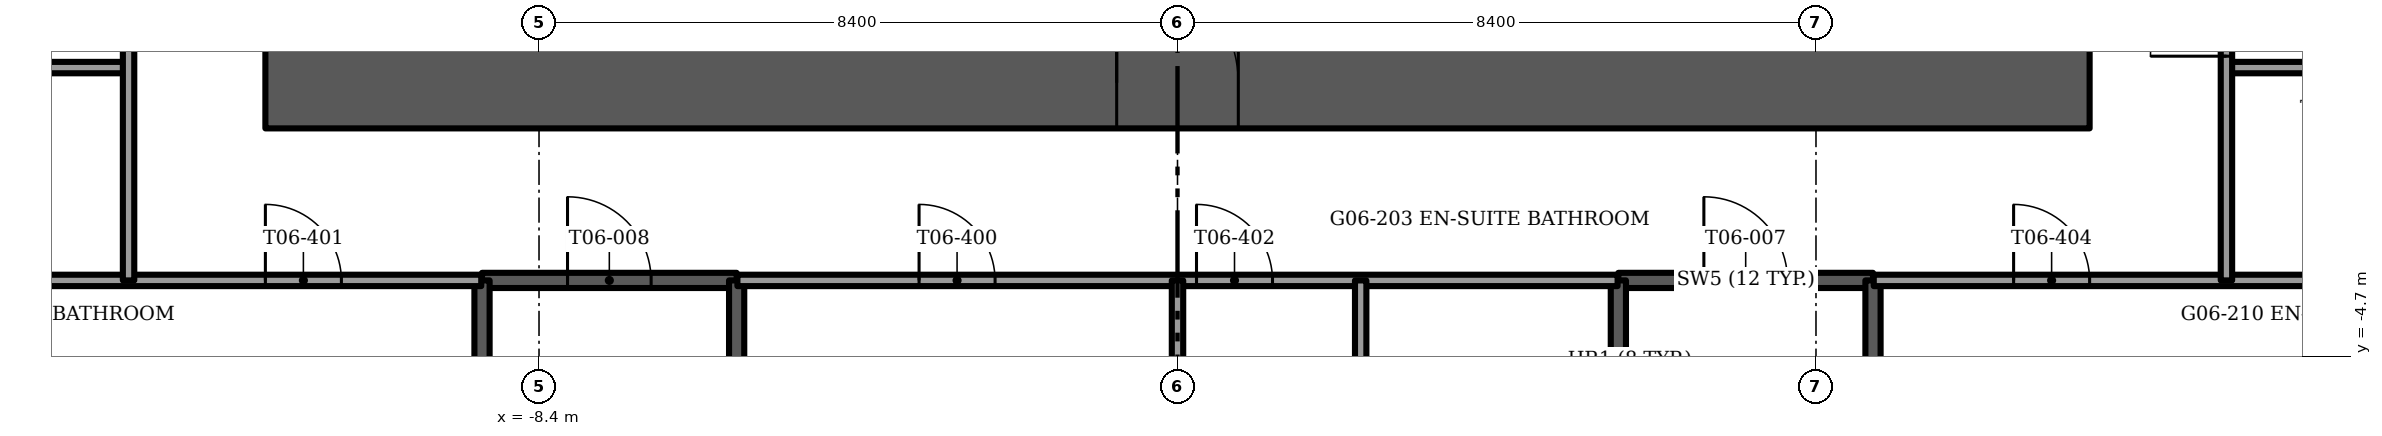
"""IFC4 building model, lengths in metres.
Left out: names, types, materials, properties, quantities, classifications, styles, units other than length and angle.
Written with IfcOpenShell. Run it as: python <this file> out.ifc"""

import sys

from ifc_helpers import new_model, si_unit, direction, frame, frame_2d, origin, place, context, subcontext, project, spatial, rectangle, extrude, element, fill, save


model = new_model("IFC4")
c1 = context("Model", 3, precision=1e-05, world=origin(), true_north=direction((0.0, 1.0)))
c2 = subcontext(c1, "Body", "Model", "MODEL_VIEW")
j1 = project(units=[si_unit("LENGTHUNIT", "METRE"), si_unit("PLANEANGLEUNIT", "RADIAN")], contexts=[c1])
p1 = place(None, origin())
s1 = spatial("IfcSite", under=j1, at=p1, CompositionType="ELEMENT")
p2 = place(p1, origin())
s2 = spatial("IfcBuilding", under=s1, at=p2, CompositionType="ELEMENT")
p3 = place(p2, frame((0.0, 0.0, 28.0)))
s3 = spatial("IfcBuildingStorey", under=s2, at=p3, CompositionType="ELEMENT", Elevation=28.0)
p4 = place(p3, frame((-12.0, -1.1, -0.3), z_axis=(0.0, 0.0, 1.0), x_axis=(1.0, 0.0, 0.0)))
e1 = element("IfcWall", 1, at=p4, inside=s3, PredefinedType="SHEAR", context=c2, shape_type="SweptSolid", body=[
    extrude(rectangle(XDim=24.0, YDim=1.2, at=frame_2d((12.0, 0.0))), origin(), (0.0, 0.0, 1.0), 3.75),
])
p5 = place(p4, frame((11.2, 0.0, 0.0)))
e2 = element("IfcOpeningElement", 2, at=p5, cuts=e1, PredefinedType="OPENING", context=c2, shape_type="SweptSolid", body=[
    extrude(rectangle(XDim=1.6, YDim=2.1, at=frame_2d((0.8, 1.05))), frame((0.0, 0.6, 0.0), z_axis=(0.0, -1.0, 0.0), x_axis=(1.0, 0.0, 0.0)), (0.0, 0.0, 1.0), 1.2),
])
p6 = place(p3, frame((-20.968, -0.532, 0.0), z_axis=(0.0, 0.0, 1.0), x_axis=(0.500003237297, -0.866023534722, 0.0)))
e3 = element("IfcWall", 3, at=p6, inside=s3, PredefinedType="SOLIDWALL", context=c2, shape_type="SweptSolid", body=[
    extrude(rectangle(XDim=20.046, YDim=0.15, at=frame_2d((10.023, 0.0))), origin(), (0.0, 0.0, 1.0), 3.45),
])
p7 = place(p6, frame((1.923, 0.0, 0.15)))
e4 = element("IfcOpeningElement", 4, at=p7, cuts=e3, PredefinedType="OPENING", context=c2, shape_type="SweptSolid", body=[
    extrude(rectangle(XDim=0.9, YDim=2.85, at=frame_2d((0.45, 1.425))), frame((0.0, 0.075, 0.0), z_axis=(0.0, -1.0, 0.0), x_axis=(1.0, 0.0, 0.0)), (0.0, 0.0, 1.0), 0.15),
])
p8 = place(p6, frame((6.123, 0.0, 0.15)))
e5 = element("IfcOpeningElement", 5, at=p8, cuts=e3, PredefinedType="OPENING", context=c2, shape_type="SweptSolid", body=[
    extrude(rectangle(XDim=1.8, YDim=2.85, at=frame_2d((0.9, 1.425))), frame((0.0, 0.075, 0.0), z_axis=(0.0, -1.0, 0.0), x_axis=(1.0, 0.0, 0.0)), (0.0, 0.0, 1.0), 0.15),
])
p9 = place(p6, frame((8.223, 0.0, 0.0)))
e6 = element("IfcOpeningElement", 6, at=p9, cuts=e3, PredefinedType="OPENING", context=c2, shape_type="SweptSolid", body=[
    extrude(rectangle(XDim=1.5, YDim=2.4, at=frame_2d((0.75, 1.2))), frame((0.0, 0.075, 0.0), z_axis=(0.0, -1.0, 0.0), x_axis=(1.0, 0.0, 0.0)), (0.0, 0.0, 1.0), 0.15),
])
p10 = place(p6, frame((10.323, 0.0, 0.15)))
e7 = element("IfcOpeningElement", 7, at=p10, cuts=e3, PredefinedType="OPENING", context=c2, shape_type="SweptSolid", body=[
    extrude(rectangle(XDim=1.8, YDim=2.85, at=frame_2d((0.9, 1.425))), frame((0.0, 0.075, 0.0), z_axis=(0.0, -1.0, 0.0), x_axis=(1.0, 0.0, 0.0)), (0.0, 0.0, 1.0), 0.15),
])
p11 = place(p6, frame((12.423, 0.0, 0.0)))
e8 = element("IfcOpeningElement", 8, at=p11, cuts=e3, PredefinedType="OPENING", context=c2, shape_type="SweptSolid", body=[
    extrude(rectangle(XDim=1.5, YDim=2.4, at=frame_2d((0.75, 1.2))), frame((0.0, 0.075, 0.0), z_axis=(0.0, -1.0, 0.0), x_axis=(1.0, 0.0, 0.0)), (0.0, 0.0, 1.0), 0.15),
])
p12 = place(p6, frame((14.523, 0.0, 0.15)))
e9 = element("IfcOpeningElement", 9, at=p12, cuts=e3, PredefinedType="OPENING", context=c2, shape_type="SweptSolid", body=[
    extrude(rectangle(XDim=1.8, YDim=2.85, at=frame_2d((0.9, 1.425))), frame((0.0, 0.075, 0.0), z_axis=(0.0, -1.0, 0.0), x_axis=(1.0, 0.0, 0.0)), (0.0, 0.0, 1.0), 0.15),
])
p13 = place(p6, frame((16.623, 0.0, 0.0)))
e10 = element("IfcOpeningElement", 10, at=p13, cuts=e3, PredefinedType="OPENING", context=c2, shape_type="SweptSolid", body=[
    extrude(rectangle(XDim=1.5, YDim=2.4, at=frame_2d((0.75, 1.2))), frame((0.0, 0.075, 0.0), z_axis=(0.0, -1.0, 0.0), x_axis=(1.0, 0.0, 0.0)), (0.0, 0.0, 1.0), 0.15),
])
p14 = place(p6, frame((0.311, 0.0, 0.15)))
e11 = element("IfcOpeningElement", 11, at=p14, cuts=e3, PredefinedType="OPENING", context=c2, shape_type="SweptSolid", body=[
    extrude(rectangle(XDim=0.9, YDim=2.73, at=frame_2d((0.45, 1.365))), frame((0.0, 0.075, 0.0), z_axis=(0.0, -1.0, 0.0), x_axis=(1.0, 0.0, 0.0)), (0.0, 0.0, 1.0), 0.15),
])
p15 = place(p6, frame((18.834, 0.0, 0.15)))
e12 = element("IfcOpeningElement", 12, at=p15, cuts=e3, PredefinedType="OPENING", context=c2, shape_type="SweptSolid", body=[
    extrude(rectangle(XDim=0.9, YDim=2.73, at=frame_2d((0.45, 1.365))), frame((0.0, 0.075, 0.0), z_axis=(0.0, -1.0, 0.0), x_axis=(1.0, 0.0, 0.0)), (0.0, 0.0, 1.0), 0.15),
])
p16 = place(p3, frame((10.945, -17.893, 0.0), z_axis=(0.0, 0.0, 1.0), x_axis=(0.500003237297, 0.866023534722, 0.0)))
e13 = element("IfcWall", 13, at=p16, inside=s3, PredefinedType="SOLIDWALL", context=c2, shape_type="SweptSolid", body=[
    extrude(rectangle(XDim=20.046, YDim=0.15, at=frame_2d((10.023, 0.0))), origin(), (0.0, 0.0, 1.0), 3.45),
])
p17 = place(p16, frame((1.923, 0.0, 0.15)))
e14 = element("IfcOpeningElement", 14, at=p17, cuts=e13, PredefinedType="OPENING", context=c2, shape_type="SweptSolid", body=[
    extrude(rectangle(XDim=1.8, YDim=2.85, at=frame_2d((0.9, 1.425))), frame((0.0, 0.075, 0.0), z_axis=(0.0, -1.0, 0.0), x_axis=(1.0, 0.0, 0.0)), (0.0, 0.0, 1.0), 0.15),
])
p18 = place(p16, frame((4.023, 0.0, 0.0)))
e15 = element("IfcOpeningElement", 15, at=p18, cuts=e13, PredefinedType="OPENING", context=c2, shape_type="SweptSolid", body=[
    extrude(rectangle(XDim=1.5, YDim=2.4, at=frame_2d((0.75, 1.2))), frame((0.0, 0.075, 0.0), z_axis=(0.0, -1.0, 0.0), x_axis=(1.0, 0.0, 0.0)), (0.0, 0.0, 1.0), 0.15),
])
p19 = place(p16, frame((6.123, 0.0, 0.15)))
e16 = element("IfcOpeningElement", 16, at=p19, cuts=e13, PredefinedType="OPENING", context=c2, shape_type="SweptSolid", body=[
    extrude(rectangle(XDim=1.8, YDim=2.85, at=frame_2d((0.9, 1.425))), frame((0.0, 0.075, 0.0), z_axis=(0.0, -1.0, 0.0), x_axis=(1.0, 0.0, 0.0)), (0.0, 0.0, 1.0), 0.15),
])
p20 = place(p16, frame((8.223, 0.0, 0.0)))
e17 = element("IfcOpeningElement", 17, at=p20, cuts=e13, PredefinedType="OPENING", context=c2, shape_type="SweptSolid", body=[
    extrude(rectangle(XDim=1.5, YDim=2.4, at=frame_2d((0.75, 1.2))), frame((0.0, 0.075, 0.0), z_axis=(0.0, -1.0, 0.0), x_axis=(1.0, 0.0, 0.0)), (0.0, 0.0, 1.0), 0.15),
])
p21 = place(p16, frame((10.323, 0.0, 0.15)))
e18 = element("IfcOpeningElement", 18, at=p21, cuts=e13, PredefinedType="OPENING", context=c2, shape_type="SweptSolid", body=[
    extrude(rectangle(XDim=1.8, YDim=2.85, at=frame_2d((0.9, 1.425))), frame((0.0, 0.075, 0.0), z_axis=(0.0, -1.0, 0.0), x_axis=(1.0, 0.0, 0.0)), (0.0, 0.0, 1.0), 0.15),
])
p22 = place(p16, frame((12.423, 0.0, 0.0)))
e19 = element("IfcOpeningElement", 19, at=p22, cuts=e13, PredefinedType="OPENING", context=c2, shape_type="SweptSolid", body=[
    extrude(rectangle(XDim=1.5, YDim=2.4, at=frame_2d((0.75, 1.2))), frame((0.0, 0.075, 0.0), z_axis=(0.0, -1.0, 0.0), x_axis=(1.0, 0.0, 0.0)), (0.0, 0.0, 1.0), 0.15),
])
p23 = place(p16, frame((14.523, 0.0, 0.15)))
e20 = element("IfcOpeningElement", 20, at=p23, cuts=e13, PredefinedType="OPENING", context=c2, shape_type="SweptSolid", body=[
    extrude(rectangle(XDim=0.9, YDim=2.85, at=frame_2d((0.45, 1.425))), frame((0.0, 0.075, 0.0), z_axis=(0.0, -1.0, 0.0), x_axis=(1.0, 0.0, 0.0)), (0.0, 0.0, 1.0), 0.15),
])
p24 = place(p16, frame((0.311, 0.0, 0.15)))
e21 = element("IfcOpeningElement", 21, at=p24, cuts=e13, PredefinedType="OPENING", context=c2, shape_type="SweptSolid", body=[
    extrude(rectangle(XDim=0.9, YDim=2.73, at=frame_2d((0.45, 1.365))), frame((0.0, 0.075, 0.0), z_axis=(0.0, -1.0, 0.0), x_axis=(1.0, 0.0, 0.0)), (0.0, 0.0, 1.0), 0.15),
])
p25 = place(p16, frame((18.834, 0.0, 0.15)))
e22 = element("IfcOpeningElement", 22, at=p25, cuts=e13, PredefinedType="OPENING", context=c2, shape_type="SweptSolid", body=[
    extrude(rectangle(XDim=0.9, YDim=2.73, at=frame_2d((0.45, 1.365))), frame((0.0, 0.075, 0.0), z_axis=(0.0, -1.0, 0.0), x_axis=(1.0, 0.0, 0.0)), (0.0, 0.0, 1.0), 0.15),
])
p26 = place(p3, frame((5.8, -3.7, -0.3), z_axis=(0.0, 0.0, 1.0), x_axis=(1.0, 0.0, 0.0)))
e23 = element("IfcWall", 23, at=p26, inside=s3, PredefinedType="SOLIDWALL", context=c2, shape_type="SweptSolid", body=[
    extrude(rectangle(XDim=3.35, YDim=0.2, at=frame_2d((1.675, 0.0))), origin(), (0.0, 0.0, 1.0), 3.75),
])
p27 = place(p26, frame((1.125, 0.0, 0.0)))
e24 = element("IfcOpeningElement", 24, at=p27, cuts=e23, PredefinedType="OPENING", context=c2, shape_type="SweptSolid", body=[
    extrude(rectangle(XDim=1.1, YDim=2.1, at=frame_2d((0.55, 1.05))), frame((0.0, 0.1, 0.0), z_axis=(0.0, -1.0, 0.0), x_axis=(1.0, 0.0, 0.0)), (0.0, 0.0, 1.0), 0.2),
])
for number, where, z_axis, x_axis in (
    (25, (5.8, -3.7, -0.3), (0.0, 0.0, 1.0), (0.0, -1.0, 0.0)),
    (26, (9.15, -3.7, -0.3), (0.0, 0.0, 1.0), (0.0, -1.0, 0.0)),
):
    element("IfcWall", number, at=place(p3, frame(where, z_axis=z_axis, x_axis=x_axis)), inside=s3, PredefinedType="SOLIDWALL", context=c2, shape_type="SweptSolid", body=[
        extrude(rectangle(XDim=7.7, YDim=0.2, at=frame_2d((3.85, 0.0))), origin(), (0.0, 0.0, 1.0), 3.75),
    ])
p28 = place(p3, frame((-9.15, -3.7, -0.3), z_axis=(0.0, 0.0, 1.0), x_axis=(1.0, 0.0, 0.0)))
e27 = element("IfcWall", 27, at=p28, inside=s3, PredefinedType="SOLIDWALL", context=c2, shape_type="SweptSolid", body=[
    extrude(rectangle(XDim=3.35, YDim=0.2, at=frame_2d((1.675, 0.0))), origin(), (0.0, 0.0, 1.0), 3.75),
])
p29 = place(p28, frame((1.125, 0.0, 0.0)))
e28 = element("IfcOpeningElement", 28, at=p29, cuts=e27, PredefinedType="OPENING", context=c2, shape_type="SweptSolid", body=[
    extrude(rectangle(XDim=1.1, YDim=2.1, at=frame_2d((0.55, 1.05))), frame((0.0, 0.1, 0.0), z_axis=(0.0, -1.0, 0.0), x_axis=(1.0, 0.0, 0.0)), (0.0, 0.0, 1.0), 0.2),
])
for number, where, z_axis, x_axis in (
    (29, (-9.15, -3.7, -0.3), (0.0, 0.0, 1.0), (0.0, -1.0, 0.0)),
    (30, (-5.8, -3.7, -0.3), (0.0, 0.0, 1.0), (0.0, -1.0, 0.0)),
):
    element("IfcWall", number, at=place(p3, frame(where, z_axis=z_axis, x_axis=x_axis)), inside=s3, PredefinedType="SOLIDWALL", context=c2, shape_type="SweptSolid", body=[
        extrude(rectangle(XDim=7.7, YDim=0.2, at=frame_2d((3.85, 0.0))), origin(), (0.0, 0.0, 1.0), 3.75),
    ])
p30 = place(p3, frame((-19.191, -3.7, 0.0), z_axis=(0.0, 0.0, 1.0), x_axis=(1.0, 0.0, 0.0)))
e31 = element("IfcWall", 31, at=p30, inside=s3, PredefinedType="PARTITIONING", context=c2, shape_type="SweptSolid", body=[
    extrude(rectangle(XDim=10.031, YDim=0.15, at=frame_2d((5.016, 0.0))), origin(), (0.0, 0.0, 1.0), 3.45),
])
p31 = place(p30, frame((7.191, 0.0, 0.0)))
e32 = element("IfcOpeningElement", 32, at=p31, cuts=e31, PredefinedType="OPENING", context=c2, shape_type="SweptSolid", body=[
    extrude(rectangle(XDim=1.0, YDim=2.1, at=frame_2d((0.5, 1.05))), frame((0.0, 0.075, 0.0), z_axis=(0.0, -1.0, 0.0), x_axis=(1.0, 0.0, 0.0)), (0.0, 0.0, 1.0), 0.15),
])
p32 = place(p3, frame((-5.79, -3.7, 0.0), z_axis=(0.0, 0.0, 1.0), x_axis=(1.0, 0.0, 0.0)))
e33 = element("IfcWall", 33, at=p32, inside=s3, PredefinedType="PARTITIONING", context=c2, shape_type="SweptSolid", body=[
    extrude(rectangle(XDim=11.58, YDim=0.15, at=frame_2d((5.79, 0.0))), origin(), (0.0, 0.0, 1.0), 3.45),
])
p33 = place(p32, frame((2.39, 0.0, 0.0)))
e34 = element("IfcOpeningElement", 34, at=p33, cuts=e33, PredefinedType="OPENING", context=c2, shape_type="SweptSolid", body=[
    extrude(rectangle(XDim=1.0, YDim=2.1, at=frame_2d((0.5, 1.05))), frame((0.0, 0.075, 0.0), z_axis=(0.0, -1.0, 0.0), x_axis=(1.0, 0.0, 0.0)), (0.0, 0.0, 1.0), 0.15),
])
p34 = place(p32, frame((6.04, 0.0, 0.0)))
e35 = element("IfcOpeningElement", 35, at=p34, cuts=e33, PredefinedType="OPENING", context=c2, shape_type="SweptSolid", body=[
    extrude(rectangle(XDim=1.0, YDim=2.1, at=frame_2d((0.5, 1.05))), frame((0.0, 0.075, 0.0), z_axis=(0.0, -1.0, 0.0), x_axis=(1.0, 0.0, 0.0)), (0.0, 0.0, 1.0), 0.15),
])
p35 = place(p3, frame((9.16, -3.7, 0.0), z_axis=(0.0, 0.0, 1.0), x_axis=(1.0, 0.0, 0.0)))
e36 = element("IfcWall", 36, at=p35, inside=s3, PredefinedType="PARTITIONING", context=c2, shape_type="SweptSolid", body=[
    extrude(rectangle(XDim=10.031, YDim=0.15, at=frame_2d((5.016, 0.0))), origin(), (0.0, 0.0, 1.0), 3.45),
])
p36 = place(p35, frame((1.84, 0.0, 0.0)))
e37 = element("IfcOpeningElement", 37, at=p36, cuts=e36, PredefinedType="OPENING", context=c2, shape_type="SweptSolid", body=[
    extrude(rectangle(XDim=1.0, YDim=2.1, at=frame_2d((0.5, 1.05))), frame((0.0, 0.075, 0.0), z_axis=(0.0, -1.0, 0.0), x_axis=(1.0, 0.0, 0.0)), (0.0, 0.0, 1.0), 0.15),
])
p37 = place(p3, frame((-16.8, -0.9, 0.0), z_axis=(0.0, 0.0, 1.0), x_axis=(1.0, 0.0, 0.0)))
e38 = element("IfcWall", 38, at=p37, inside=s3, PredefinedType="PARTITIONING", context=c2, shape_type="SweptSolid", body=[
    extrude(rectangle(XDim=3.0, YDim=0.15, at=frame_2d((1.5, 0.0))), origin(), (0.0, 0.0, 1.0), 3.45),
])
p38 = place(p37, frame((1.1, 0.0, 0.0)))
e39 = element("IfcOpeningElement", 39, at=p38, cuts=e38, PredefinedType="OPENING", context=c2, shape_type="SweptSolid", body=[
    extrude(rectangle(XDim=0.8, YDim=2.1, at=frame_2d((0.4, 1.05))), frame((0.0, 0.075, 0.0), z_axis=(0.0, -1.0, 0.0), x_axis=(1.0, 0.0, 0.0)), (0.0, 0.0, 1.0), 0.15),
])
p39 = place(p3, frame((13.8, -0.9, 0.0), z_axis=(0.0, 0.0, 1.0), x_axis=(1.0, 0.0, 0.0)))
e40 = element("IfcWall", 40, at=p39, inside=s3, PredefinedType="PARTITIONING", context=c2, shape_type="SweptSolid", body=[
    extrude(rectangle(XDim=3.0, YDim=0.15, at=frame_2d((1.5, 0.0))), origin(), (0.0, 0.0, 1.0), 3.45),
])
p40 = place(p39, frame((1.1, 0.0, 0.0)))
e41 = element("IfcOpeningElement", 41, at=p40, cuts=e40, PredefinedType="OPENING", context=c2, shape_type="SweptSolid", body=[
    extrude(rectangle(XDim=0.8, YDim=2.1, at=frame_2d((0.4, 1.05))), frame((0.0, 0.075, 0.0), z_axis=(0.0, -1.0, 0.0), x_axis=(1.0, 0.0, 0.0)), (0.0, 0.0, 1.0), 0.15),
])
p41 = place(p3, frame((13.8, -3.7, 0.0), z_axis=(0.0, 0.0, 1.0), x_axis=(0.0, 1.0, 0.0)))
e42 = element("IfcWall", 42, at=p41, inside=s3, PredefinedType="PARTITIONING", context=c2, shape_type="SweptSolid", body=[
    extrude(rectangle(XDim=16.738, YDim=0.15, at=frame_2d((8.369, 0.0))), origin(), (0.0, 0.0, 1.0), 3.45),
])
p42 = place(p41, frame((2.95, 0.0, 0.0)))
e43 = element("IfcOpeningElement", 43, at=p42, cuts=e42, PredefinedType="OPENING", context=c2, shape_type="SweptSolid", body=[
    extrude(rectangle(XDim=1.0, YDim=2.1, at=frame_2d((0.5, 1.05))), frame((0.0, 0.075, 0.0), z_axis=(0.0, -1.0, 0.0), x_axis=(1.0, 0.0, 0.0)), (0.0, 0.0, 1.0), 0.15),
])
p43 = place(p41, frame((10.0, 0.0, 0.0)))
e44 = element("IfcOpeningElement", 44, at=p43, cuts=e42, PredefinedType="OPENING", context=c2, shape_type="SweptSolid", body=[
    extrude(rectangle(XDim=1.0, YDim=2.1, at=frame_2d((0.5, 1.05))), frame((0.0, 0.075, 0.0), z_axis=(0.0, -1.0, 0.0), x_axis=(1.0, 0.0, 0.0)), (0.0, 0.0, 1.0), 0.15),
])
p44 = place(p41, frame((14.047, 0.0, 0.0)))
e45 = element("IfcOpeningElement", 45, at=p44, cuts=e42, PredefinedType="OPENING", context=c2, shape_type="SweptSolid", body=[
    extrude(rectangle(XDim=1.0, YDim=2.1, at=frame_2d((0.5, 1.05))), frame((0.0, 0.075, 0.0), z_axis=(0.0, -1.0, 0.0), x_axis=(1.0, 0.0, 0.0)), (0.0, 0.0, 1.0), 0.15),
])
p45 = place(p3, frame((2.41, -7.3, 0.0), z_axis=(0.0, 0.0, 1.0), x_axis=(0.0, 1.0, 0.0)))
e46 = element("IfcWall", 46, at=p45, inside=s3, PredefinedType="PARTITIONING", context=c2, shape_type="SweptSolid", body=[
    extrude(rectangle(XDim=3.6, YDim=0.15, at=frame_2d((1.8, 0.0))), origin(), (0.0, 0.0, 1.0), 3.45),
])
p46 = place(p45, frame((1.4, 0.0, 0.0)))
e47 = element("IfcOpeningElement", 47, at=p46, cuts=e46, PredefinedType="OPENING", context=c2, shape_type="SweptSolid", body=[
    extrude(rectangle(XDim=0.8, YDim=2.1, at=frame_2d((0.4, 1.05))), frame((0.0, 0.075, 0.0), z_axis=(0.0, -1.0, 0.0), x_axis=(1.0, 0.0, 0.0)), (0.0, 0.0, 1.0), 0.15),
])
p47 = place(p3, frame((0.0, -18.47, 0.0), z_axis=(0.0, 0.0, 1.0), x_axis=(0.0, 1.0, 0.0)))
e48 = element("IfcWall", 48, at=p47, inside=s3, PredefinedType="PARTITIONING", context=c2, shape_type="SweptSolid", body=[
    extrude(rectangle(XDim=14.77, YDim=0.15, at=frame_2d((7.385, 0.0))), origin(), (0.0, 0.0, 1.0), 3.45),
])
p48 = place(p3, frame((-13.8, -3.7, 0.0), z_axis=(0.0, 0.0, 1.0), x_axis=(0.0, 1.0, 0.0)))
e49 = element("IfcWall", 49, at=p48, inside=s3, PredefinedType="PARTITIONING", context=c2, shape_type="SweptSolid", body=[
    extrude(rectangle(XDim=16.738, YDim=0.15, at=frame_2d((8.369, 0.0))), origin(), (0.0, 0.0, 1.0), 3.45),
])
p49 = place(p48, frame((5.8, 0.0, 0.0)))
e50 = element("IfcOpeningElement", 50, at=p49, cuts=e49, PredefinedType="OPENING", context=c2, shape_type="SweptSolid", body=[
    extrude(rectangle(XDim=1.0, YDim=2.1, at=frame_2d((0.5, 1.05))), frame((0.0, 0.075, 0.0), z_axis=(0.0, -1.0, 0.0), x_axis=(1.0, 0.0, 0.0)), (0.0, 0.0, 1.0), 0.15),
])
p50 = place(p48, frame((11.948, 0.0, 0.0)))
e51 = element("IfcOpeningElement", 51, at=p50, cuts=e49, PredefinedType="OPENING", context=c2, shape_type="SweptSolid", body=[
    extrude(rectangle(XDim=1.0, YDim=2.1, at=frame_2d((0.5, 1.05))), frame((0.0, 0.075, 0.0), z_axis=(0.0, -1.0, 0.0), x_axis=(1.0, 0.0, 0.0)), (0.0, 0.0, 1.0), 0.15),
])
p51 = place(p5, origin())
e52 = element("IfcDoor", 52, at=p51, inside=s3, OperationType="DOUBLE_DOOR_SINGLE_SWING", PredefinedType="DOOR", context=c2, shape_type="SweptSolid", body=[
    extrude(rectangle(XDim=1.6, YDim=2.1, at=frame_2d((0.8, 1.05))), frame((0.0, 0.025, 0.0), z_axis=(0.0, -1.0, 0.0), x_axis=(1.0, 0.0, 0.0)), (0.0, 0.0, 1.0), 0.05),
])
fill(e2, e52)
p52 = place(p27, origin())
e53 = element("IfcDoor", 53, at=p52, inside=s3, OperationType="SINGLE_SWING_LEFT", PredefinedType="DOOR", context=c2, shape_type="SweptSolid", body=[
    extrude(rectangle(XDim=1.1, YDim=2.1, at=frame_2d((0.55, 1.05))), frame((0.0, 0.025, 0.0), z_axis=(0.0, -1.0, 0.0), x_axis=(1.0, 0.0, 0.0)), (0.0, 0.0, 1.0), 0.05),
])
fill(e24, e53)
p53 = place(p29, origin())
e54 = element("IfcDoor", 54, at=p53, inside=s3, OperationType="SINGLE_SWING_LEFT", PredefinedType="DOOR", context=c2, shape_type="SweptSolid", body=[
    extrude(rectangle(XDim=1.1, YDim=2.1, at=frame_2d((0.55, 1.05))), frame((0.0, 0.025, 0.0), z_axis=(0.0, -1.0, 0.0), x_axis=(1.0, 0.0, 0.0)), (0.0, 0.0, 1.0), 0.05),
])
fill(e28, e54)
p54 = place(p33, origin())
e55 = element("IfcDoor", 55, at=p54, inside=s3, OperationType="SINGLE_SWING_RIGHT", PredefinedType="DOOR", context=c2, shape_type="SweptSolid", body=[
    extrude(rectangle(XDim=1.0, YDim=2.1, at=frame_2d((0.5, 1.05))), frame((0.0, 0.025, 0.0), z_axis=(0.0, -1.0, 0.0), x_axis=(1.0, 0.0, 0.0)), (0.0, 0.0, 1.0), 0.05),
])
fill(e34, e55)
p55 = place(p31, origin())
e56 = element("IfcDoor", 56, at=p55, inside=s3, OperationType="SINGLE_SWING_RIGHT", PredefinedType="DOOR", context=c2, shape_type="SweptSolid", body=[
    extrude(rectangle(XDim=1.0, YDim=2.1, at=frame_2d((0.5, 1.05))), frame((0.0, 0.025, 0.0), z_axis=(0.0, -1.0, 0.0), x_axis=(1.0, 0.0, 0.0)), (0.0, 0.0, 1.0), 0.05),
])
fill(e32, e56)
p56 = place(p34, origin())
e57 = element("IfcDoor", 57, at=p56, inside=s3, OperationType="SINGLE_SWING_LEFT", PredefinedType="DOOR", context=c2, shape_type="SweptSolid", body=[
    extrude(rectangle(XDim=1.0, YDim=2.1, at=frame_2d((0.5, 1.05))), frame((0.0, 0.025, 0.0), z_axis=(0.0, -1.0, 0.0), x_axis=(1.0, 0.0, 0.0)), (0.0, 0.0, 1.0), 0.05),
])
fill(e35, e57)
p57 = place(p36, origin())
e58 = element("IfcDoor", 58, at=p57, inside=s3, OperationType="SINGLE_SWING_LEFT", PredefinedType="DOOR", context=c2, shape_type="SweptSolid", body=[
    extrude(rectangle(XDim=1.0, YDim=2.1, at=frame_2d((0.5, 1.05))), frame((0.0, 0.025, 0.0), z_axis=(0.0, -1.0, 0.0), x_axis=(1.0, 0.0, 0.0)), (0.0, 0.0, 1.0), 0.05),
])
fill(e37, e58)
p58 = place(p42, origin())
e59 = element("IfcDoor", 59, at=p58, inside=s3, OperationType="SINGLE_SWING_RIGHT", PredefinedType="DOOR", context=c2, shape_type="SweptSolid", body=[
    extrude(rectangle(XDim=1.0, YDim=2.1, at=frame_2d((0.5, 1.05))), frame((0.0, 0.025, 0.0), z_axis=(0.0, -1.0, 0.0), x_axis=(1.0, 0.0, 0.0)), (0.0, 0.0, 1.0), 0.05),
])
fill(e43, e59)
save(model, sys.argv[1])
